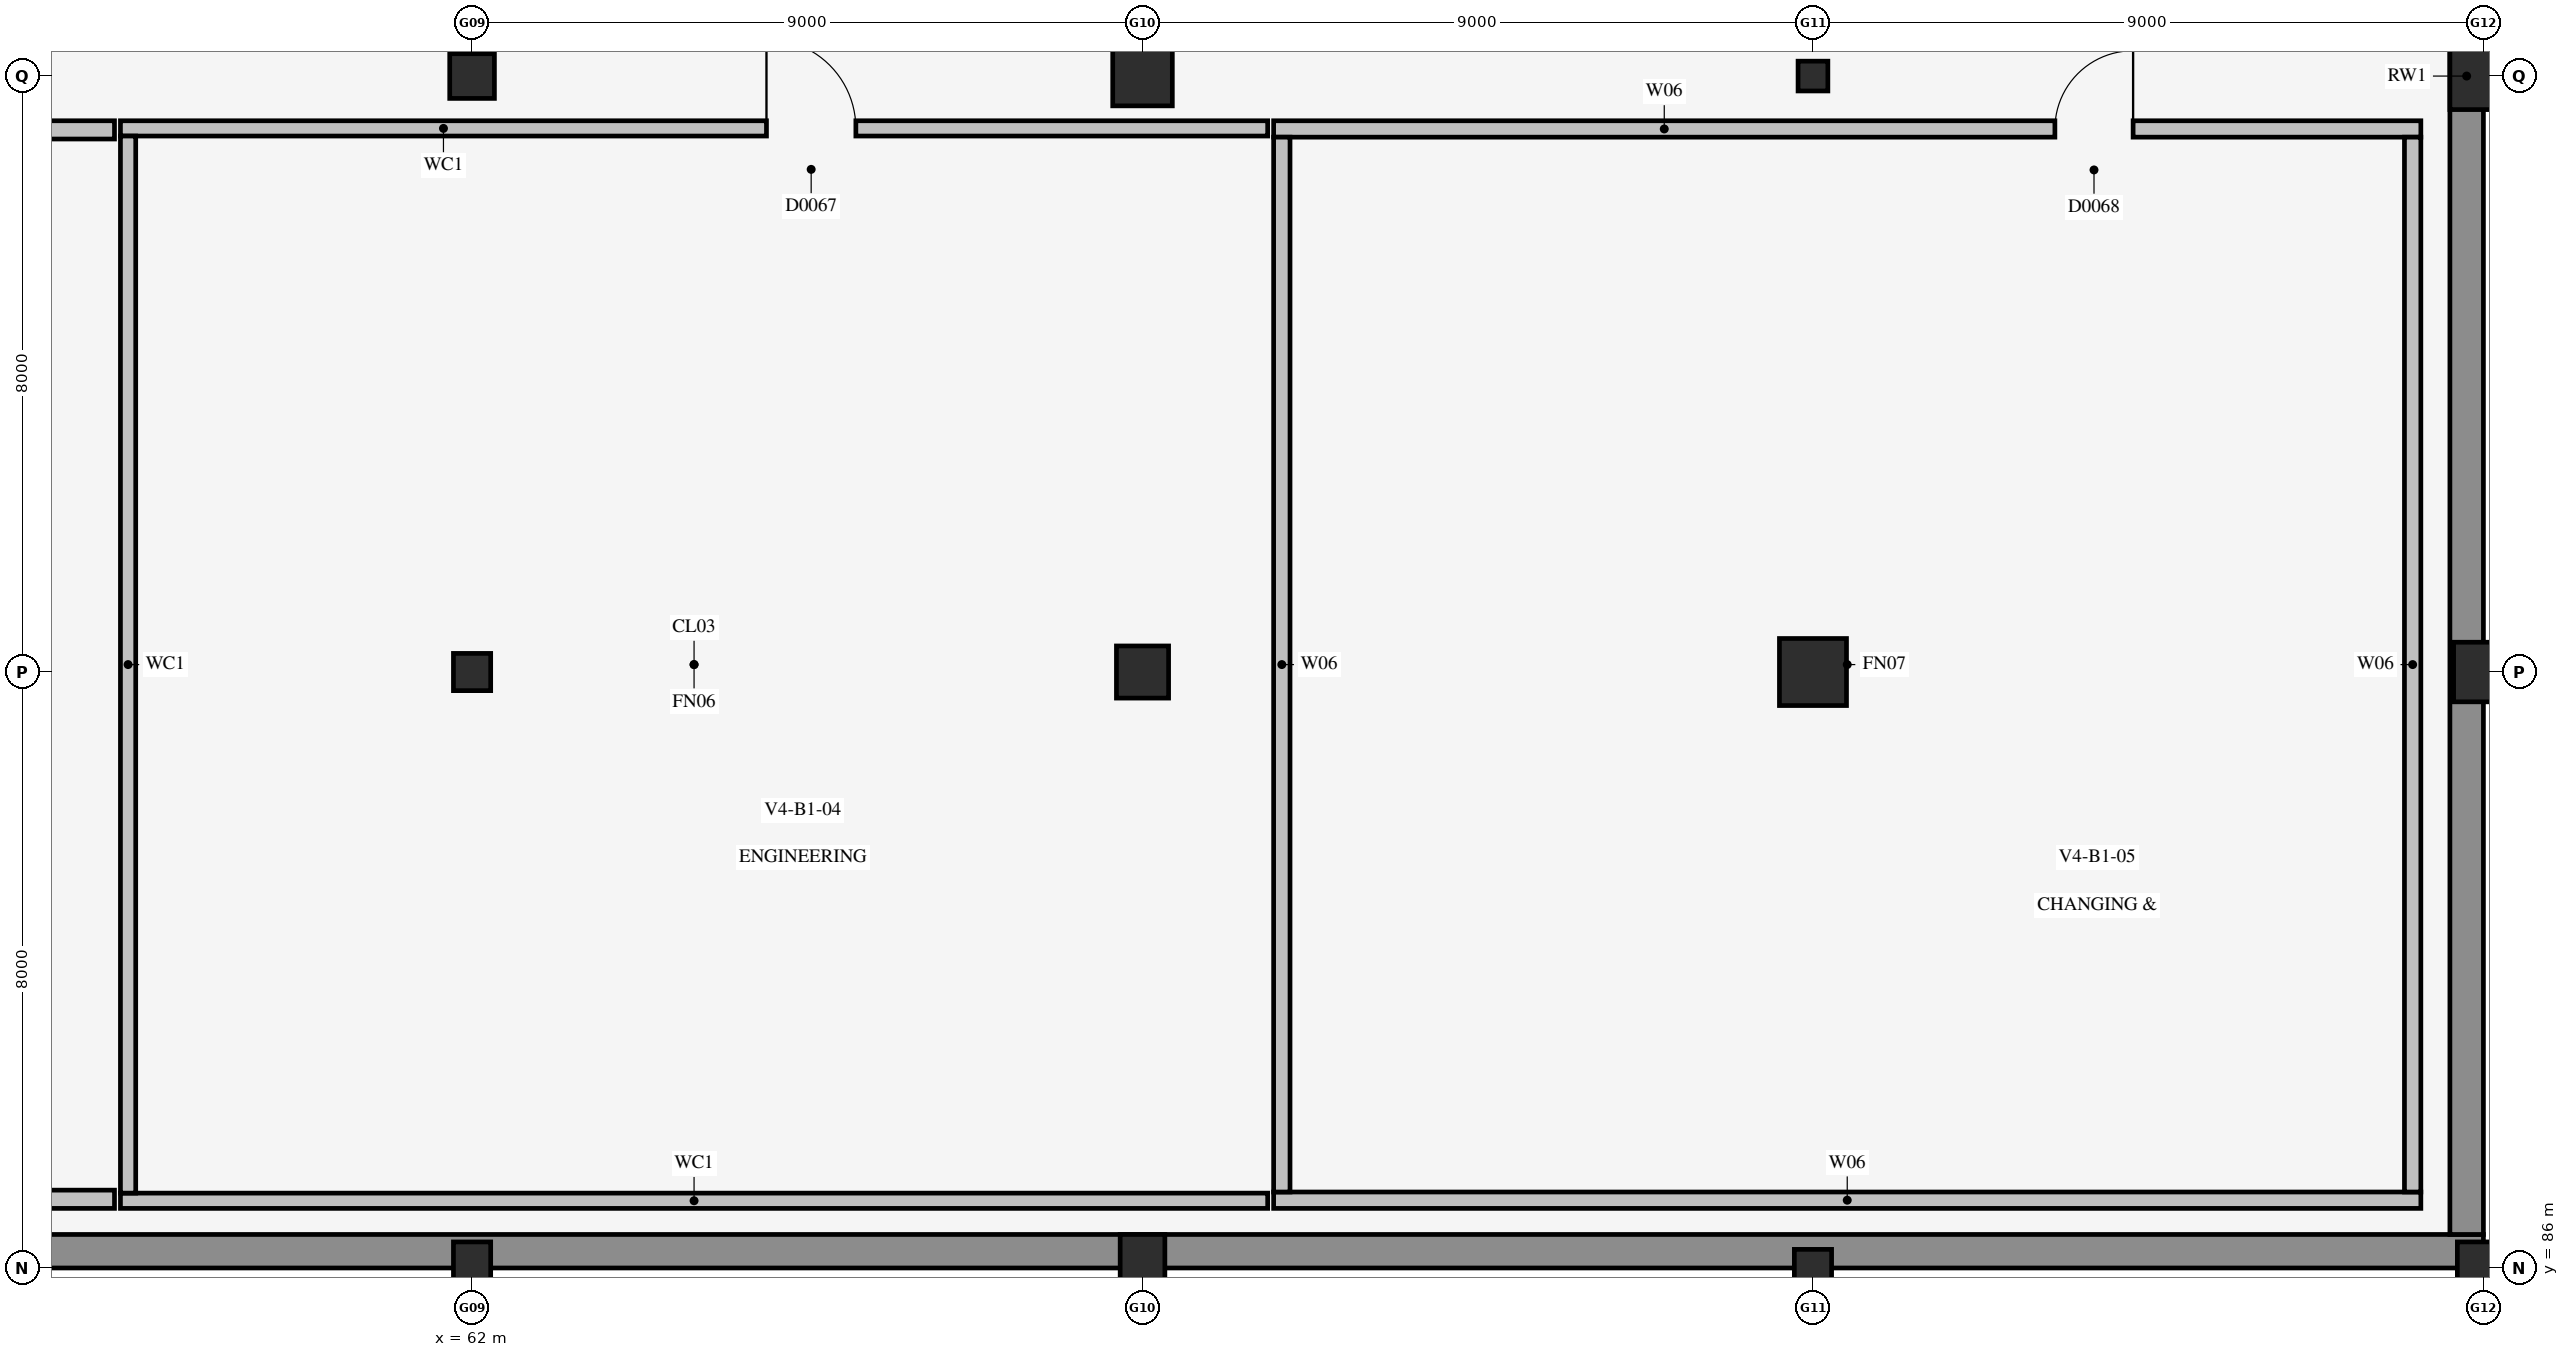
"""IFC4 building model, lengths in metres.
Left out: names, types, materials, properties, quantities, classifications, styles, units other than length and angle.
Written with IfcOpenShell. Run it as: python <this file> out.ifc"""

import sys

from ifc_helpers import new_model, si_unit, direction, frame, frame_2d, origin, origin_2d, place, context, subcontext, project, spatial, rectangle, circle, extrude, element, fill, save


model = new_model("IFC4")
c1 = context("Model", 3, precision=1e-05, world=origin(), true_north=direction((0.0, 1.0)))
c2 = subcontext(c1, "Body", "Model", "MODEL_VIEW")
j1 = project(units=[si_unit("LENGTHUNIT", "METRE"), si_unit("PLANEANGLEUNIT", "RADIAN")], contexts=[c1])
p1 = place(None, origin())
s1 = spatial("IfcSite", under=j1, at=p1, CompositionType="ELEMENT")
p2 = place(p1, origin())
s2 = spatial("IfcBuilding", under=s1, at=p2, CompositionType="ELEMENT")
p3 = place(p2, frame((0.0, 0.0, -5.2)))
s3 = spatial("IfcBuildingStorey", under=s2, at=p3, CompositionType="ELEMENT", Elevation=-5.2)
p4 = place(p3, frame((10.0, 86.225, 0.0), z_axis=(0.0, 0.0, 1.0), x_axis=(1.0, 0.0, 0.0)))
e1 = element("IfcWall", 1, at=p4, inside=s3, PredefinedType="USERDEFINED", context=c2, shape_type="SweptSolid", body=[
    extrude(rectangle(XDim=79.0, YDim=0.45, at=frame_2d((39.5, 0.0))), origin(), (0.0, 0.0, 1.0), 4.94),
])
p5 = place(p3, frame((88.775, 86.45, 0.0), z_axis=(0.0, 0.0, 1.0), x_axis=(0.0, 1.0, 0.0)))
e2 = element("IfcWall", 2, at=p5, inside=s3, PredefinedType="USERDEFINED", context=c2, shape_type="SweptSolid", body=[
    extrude(rectangle(XDim=31.1, YDim=0.45, at=frame_2d((15.55, 0.0))), origin(), (0.0, 0.0, 1.0), 4.94),
])
p6 = place(p3, frame((62.0, 86.0, 0.0), z_axis=(0.0, 0.0, 1.0), x_axis=(1.0, 0.0, 0.0)))
e3 = element("IfcColumn", 3, at=p6, inside=s3, PredefinedType="COLUMN", context=c2, shape_type="SweptSolid", body=[
    extrude(rectangle(XDim=0.5, YDim=0.7, at=origin_2d()), origin(), (0.0, 0.0, 1.0), 5.2),
])
p7 = place(p3, frame((62.0, 94.0, 0.0), z_axis=(0.0, 0.0, 1.0), x_axis=(1.0, 0.0, 0.0)))
e4 = element("IfcColumn", 4, at=p7, inside=s3, PredefinedType="COLUMN", context=c2, shape_type="SweptSolid", body=[
    extrude(circle(Radius=0.25, at=origin_2d()), origin(), (0.0, 0.0, 1.0), 5.2),
])
p8 = place(p3, frame((62.0, 102.0, 0.0), z_axis=(0.0, 0.0, 1.0), x_axis=(1.0, 0.0, 0.0)))
e5 = element("IfcColumn", 5, at=p8, inside=s3, PredefinedType="COLUMN", context=c2, shape_type="SweptSolid", body=[
    extrude(circle(Radius=0.3, at=origin_2d()), origin(), (0.0, 0.0, 1.0), 5.2),
])
p9 = place(p3, frame((71.0, 86.0, 0.0), z_axis=(0.0, 0.0, 1.0), x_axis=(1.0, 0.0, 0.0)))
e6 = element("IfcColumn", 6, at=p9, inside=s3, PredefinedType="COLUMN", context=c2, shape_type="SweptSolid", body=[
    extrude(rectangle(XDim=0.6, YDim=0.9, at=origin_2d()), origin(), (0.0, 0.0, 1.0), 5.2),
])
p10 = place(p3, frame((71.0, 94.0, 0.0), z_axis=(0.0, 0.0, 1.0), x_axis=(1.0, 0.0, 0.0)))
e7 = element("IfcColumn", 7, at=p10, inside=s3, PredefinedType="COLUMN", context=c2, shape_type="SweptSolid", body=[
    extrude(circle(Radius=0.35, at=origin_2d()), origin(), (0.0, 0.0, 1.0), 5.2),
])
p11 = place(p3, frame((71.0, 102.0, 0.0), z_axis=(0.0, 0.0, 1.0), x_axis=(1.0, 0.0, 0.0)))
e8 = element("IfcColumn", 8, at=p11, inside=s3, PredefinedType="COLUMN", context=c2, shape_type="SweptSolid", body=[
    extrude(circle(Radius=0.4, at=origin_2d()), origin(), (0.0, 0.0, 1.0), 5.2),
])
p12 = place(p3, frame((80.0, 86.0, 0.0), z_axis=(0.0, 0.0, 1.0), x_axis=(1.0, 0.0, 0.0)))
e9 = element("IfcColumn", 9, at=p12, inside=s3, PredefinedType="COLUMN", context=c2, shape_type="SweptSolid", body=[
    extrude(circle(Radius=0.25, at=origin_2d()), origin(), (0.0, 0.0, 1.0), 5.2),
])
p13 = place(p3, frame((80.0, 94.0, 0.0), z_axis=(0.0, 0.0, 1.0), x_axis=(1.0, 0.0, 0.0)))
e10 = element("IfcColumn", 10, at=p13, inside=s3, PredefinedType="COLUMN", context=c2, shape_type="SweptSolid", body=[
    extrude(circle(Radius=0.45, at=origin_2d()), origin(), (0.0, 0.0, 1.0), 5.2),
])
p14 = place(p3, frame((80.0, 102.0, 0.0), z_axis=(0.0, 0.0, 1.0), x_axis=(1.0, 0.0, 0.0)))
e11 = element("IfcColumn", 11, at=p14, inside=s3, PredefinedType="COLUMN", context=c2, shape_type="SweptSolid", body=[
    extrude(rectangle(XDim=0.4, YDim=0.4, at=origin_2d()), origin(), (0.0, 0.0, 1.0), 5.2),
])
p15 = place(p3, frame((89.0, 86.0, 0.0), z_axis=(0.0, 0.0, 1.0), x_axis=(1.0, 0.0, 0.0)))
e12 = element("IfcColumn", 12, at=p15, inside=s3, PredefinedType="COLUMN", context=c2, shape_type="SweptSolid", body=[
    extrude(circle(Radius=0.35, at=origin_2d()), origin(), (0.0, 0.0, 1.0), 5.2),
])
p16 = place(p3, frame((89.0, 94.0, 0.0), z_axis=(0.0, 0.0, 1.0), x_axis=(1.0, 0.0, 0.0)))
e13 = element("IfcColumn", 13, at=p16, inside=s3, PredefinedType="COLUMN", context=c2, shape_type="SweptSolid", body=[
    extrude(circle(Radius=0.4, at=origin_2d()), origin(), (0.0, 0.0, 1.0), 5.2),
])
p17 = place(p3, frame((89.0, 102.0, 0.0), z_axis=(0.0, 0.0, 1.0), x_axis=(1.0, 0.0, 0.0)))
e14 = element("IfcColumn", 14, at=p17, inside=s3, PredefinedType="COLUMN", context=c2, shape_type="SweptSolid", body=[
    extrude(circle(Radius=0.45, at=origin_2d()), origin(), (0.0, 0.0, 1.0), 5.2),
])
p18 = place(p3, frame((41.8, 86.923, 0.0), z_axis=(0.0, 0.0, 1.0), x_axis=(1.0, 0.0, 0.0)))
e15 = element("IfcWall", 15, at=p18, inside=s3, PredefinedType="SOLIDWALL", context=c2, shape_type="SweptSolid", body=[
    extrude(rectangle(XDim=15.4, YDim=0.245, at=frame_2d((7.7, 0.0))), origin(), (0.0, 0.0, 1.0), 4.925),
])
p19 = place(p3, frame((41.8, 101.278, 0.0), z_axis=(0.0, 0.0, 1.0), x_axis=(1.0, 0.0, 0.0)))
e16 = element("IfcWall", 16, at=p19, inside=s3, PredefinedType="SOLIDWALL", context=c2, shape_type="SweptSolid", body=[
    extrude(rectangle(XDim=15.4, YDim=0.245, at=frame_2d((7.7, 0.0))), origin(), (0.0, 0.0, 1.0), 4.925),
])
p20 = place(p19, frame((6.8, 0.0, 0.0)))
e17 = element("IfcOpeningElement", 17, at=p20, cuts=e16, PredefinedType="OPENING", context=c2, shape_type="SweptSolid", body=[
    extrude(rectangle(XDim=1.8, YDim=2.35, at=frame_2d((0.9, 1.175))), frame((0.0, 0.135, 0.0), z_axis=(0.0, -1.0, 0.0), x_axis=(1.0, 0.0, 0.0)), (0.0, 0.0, 1.0), 0.269),
])
p21 = place(p3, frame((57.28, 86.903, 0.0), z_axis=(0.0, 0.0, 1.0), x_axis=(1.0, 0.0, 0.0)))
e18 = element("IfcWall", 18, at=p21, inside=s3, PredefinedType="SOLIDWALL", context=c2, shape_type="SweptSolid", body=[
    extrude(rectangle(XDim=15.4, YDim=0.205, at=frame_2d((7.7, 0.0))), origin(), (0.0, 0.0, 1.0), 4.925),
])
p22 = place(p3, frame((57.28, 101.298, 0.0), z_axis=(0.0, 0.0, 1.0), x_axis=(1.0, 0.0, 0.0)))
e19 = element("IfcWall", 19, at=p22, inside=s3, PredefinedType="SOLIDWALL", context=c2, shape_type="SweptSolid", body=[
    extrude(rectangle(XDim=15.4, YDim=0.205, at=frame_2d((7.7, 0.0))), origin(), (0.0, 0.0, 1.0), 4.925),
])
p23 = place(p22, frame((8.672, 0.0, 0.0)))
e20 = element("IfcOpeningElement", 20, at=p23, cuts=e19, PredefinedType="OPENING", context=c2, shape_type="SweptSolid", body=[
    extrude(rectangle(XDim=1.2, YDim=2.2, at=frame_2d((0.6, 1.1))), frame((0.0, 0.115, 0.0), z_axis=(0.0, -1.0, 0.0), x_axis=(1.0, 0.0, 0.0)), (0.0, 0.0, 1.0), 0.229),
])
p24 = place(p3, frame((57.383, 87.005, 0.0), z_axis=(0.0, 0.0, 1.0), x_axis=(0.0, 1.0, 0.0)))
e21 = element("IfcWall", 21, at=p24, inside=s3, PredefinedType="SOLIDWALL", context=c2, shape_type="SweptSolid", body=[
    extrude(rectangle(XDim=14.19, YDim=0.205, at=frame_2d((7.095, 0.0))), origin(), (0.0, 0.0, 1.0), 4.925),
])
p25 = place(p3, frame((72.76, 86.91, 0.0), z_axis=(0.0, 0.0, 1.0), x_axis=(1.0, 0.0, 0.0)))
e22 = element("IfcWall", 22, at=p25, inside=s3, PredefinedType="PLUMBINGWALL", context=c2, shape_type="SweptSolid", body=[
    extrude(rectangle(XDim=15.4, YDim=0.22, at=frame_2d((7.7, 0.0))), origin(), (0.0, 0.0, 1.0), 4.925),
])
p26 = place(p3, frame((72.76, 101.29, 0.0), z_axis=(0.0, 0.0, 1.0), x_axis=(1.0, 0.0, 0.0)))
e23 = element("IfcWall", 23, at=p26, inside=s3, PredefinedType="PLUMBINGWALL", context=c2, shape_type="SweptSolid", body=[
    extrude(rectangle(XDim=15.4, YDim=0.22, at=frame_2d((7.7, 0.0))), origin(), (0.0, 0.0, 1.0), 4.925),
])
p27 = place(p26, frame((10.488, 0.0, 0.0)))
e24 = element("IfcOpeningElement", 24, at=p27, cuts=e23, PredefinedType="OPENING", context=c2, shape_type="SweptSolid", body=[
    extrude(rectangle(XDim=1.05, YDim=2.15, at=frame_2d((0.525, 1.075))), frame((0.0, 0.122, 0.0), z_axis=(0.0, -1.0, 0.0), x_axis=(1.0, 0.0, 0.0)), (0.0, 0.0, 1.0), 0.244),
])
for number, where, z_axis, x_axis in (
    (25, (88.05, 87.02, 0.0), (0.0, 0.0, 1.0), (0.0, 1.0, 0.0)),
    (26, (72.87, 87.02, 0.0), (0.0, 0.0, 1.0), (0.0, 1.0, 0.0)),
):
    element("IfcWall", number, at=place(p3, frame(where, z_axis=z_axis, x_axis=x_axis)), inside=s3, PredefinedType="PLUMBINGWALL", context=c2, shape_type="SweptSolid", body=[
        extrude(rectangle(XDim=14.16, YDim=0.22, at=frame_2d((7.08, 0.0))), origin(), (0.0, 0.0, 1.0), 4.925),
    ])
p28 = place(p23, frame((1.2, 0.0, 0.0), z_axis=(0.0, 0.0, 1.0), x_axis=(-1.0, 0.0, 0.0)))
e27 = element("IfcDoor", 27, at=p28, inside=s3, OperationType="SINGLE_SWING_LEFT", PredefinedType="DOOR", context=c2, shape_type="SweptSolid", body=[
    extrude(rectangle(XDim=1.2, YDim=2.2, at=frame_2d((0.6, 1.1))), frame((0.0, 0.025, 0.0), z_axis=(0.0, -1.0, 0.0), x_axis=(1.0, 0.0, 0.0)), (0.0, 0.0, 1.0), 0.05),
])
fill(e20, e27)
p29 = place(p27, frame((1.05, 0.0, 0.0), z_axis=(0.0, 0.0, 1.0), x_axis=(-1.0, 0.0, 0.0)))
e28 = element("IfcDoor", 28, at=p29, inside=s3, OperationType="SINGLE_SWING_RIGHT", PredefinedType="DOOR", context=c2, shape_type="SweptSolid", body=[
    extrude(rectangle(XDim=1.05, YDim=2.15, at=frame_2d((0.525, 1.075))), frame((0.0, 0.025, 0.0), z_axis=(0.0, -1.0, 0.0), x_axis=(1.0, 0.0, 0.0)), (0.0, 0.0, 1.0), 0.05),
])
fill(e24, e28)
save(model, sys.argv[1])
